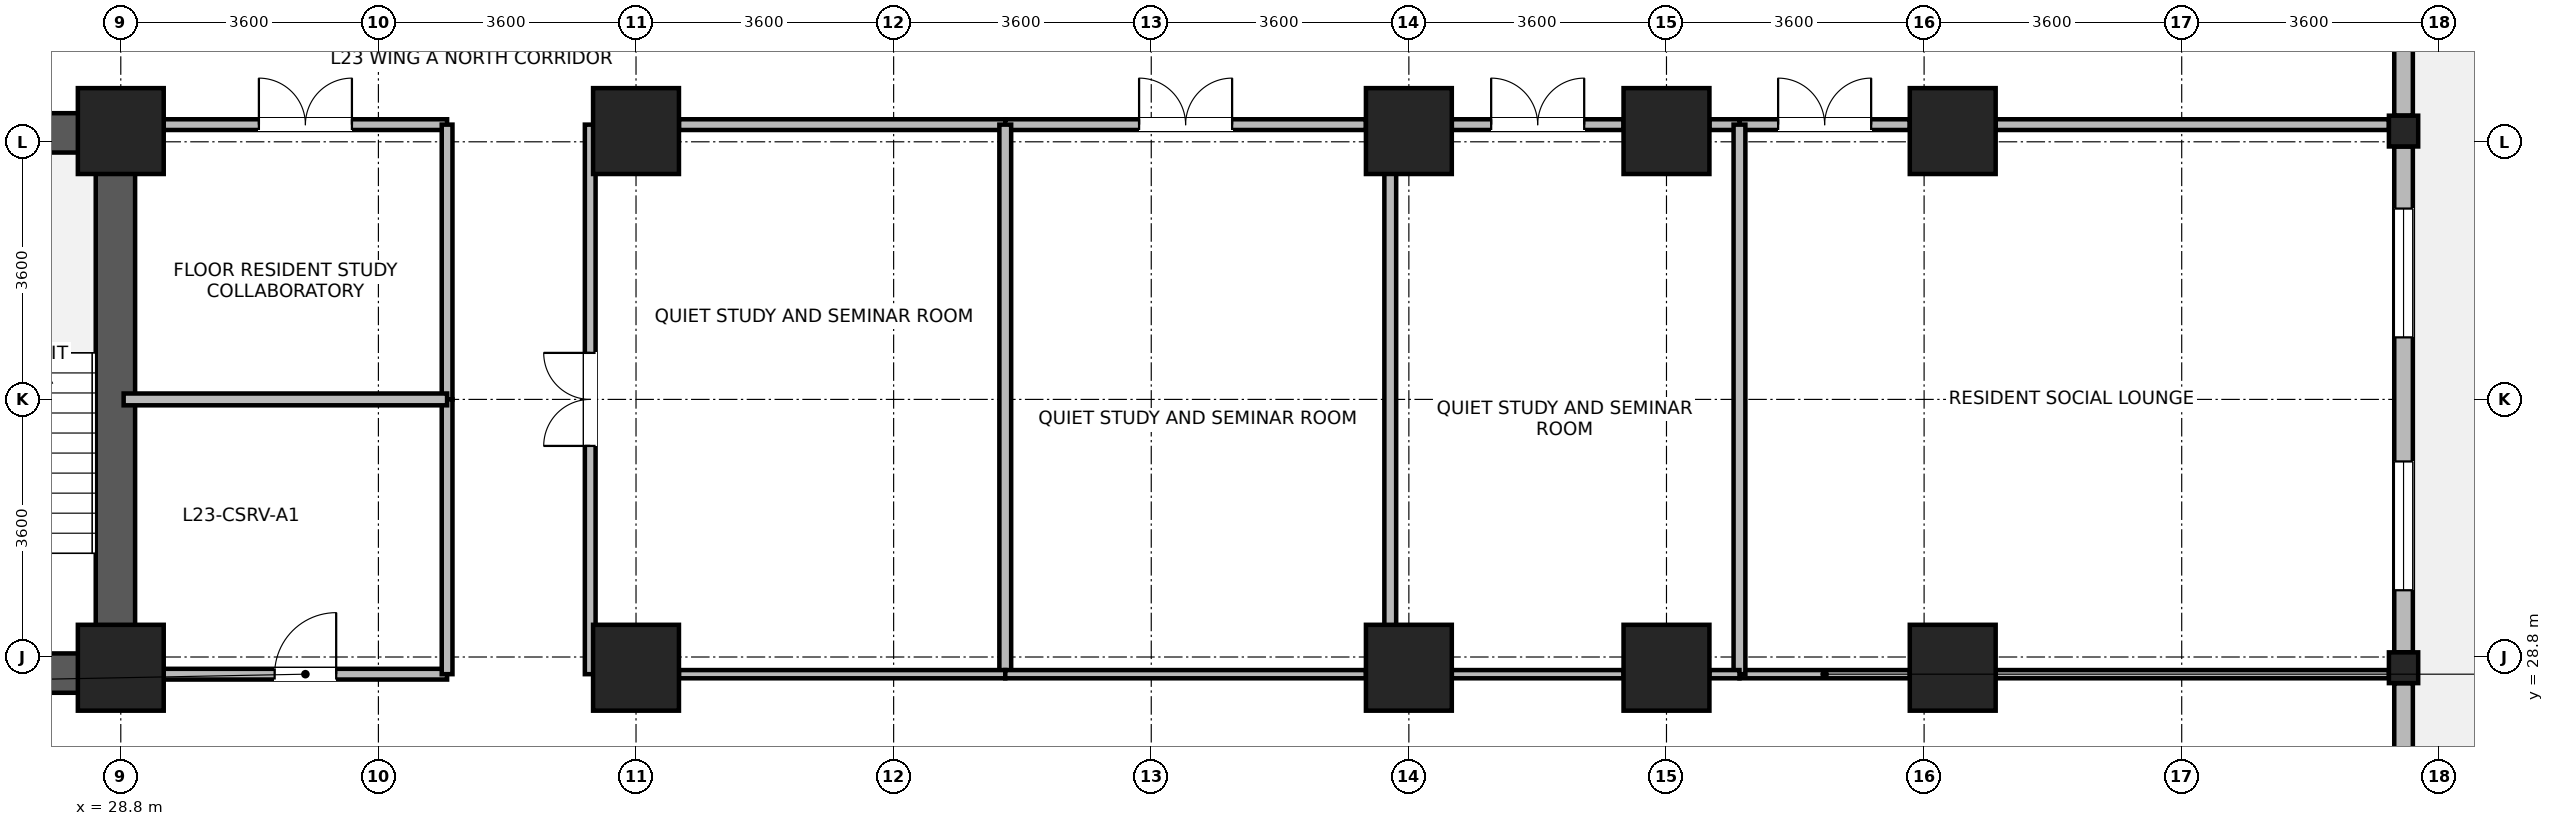
"""IFC4 building model, lengths in metres.
Left out: names, types, materials, properties, quantities, classifications, styles, units other than length and angle.
Written with IfcOpenShell. Run it as: python <this file> out.ifc"""

import sys

from ifc_helpers import new_model, si_unit, direction, frame, frame_2d, origin, origin_2d, place, context, subcontext, project, spatial, rectangle, i_section, extrude, source, transform, mapped, element, fill, save


model = new_model("IFC4")
c1 = context("Model", 3, precision=1e-05, world=origin(), true_north=direction((0.0, 1.0)))
c2 = subcontext(c1, "Body", "Model", "MODEL_VIEW")
j1 = project(units=[si_unit("LENGTHUNIT", "METRE"), si_unit("PLANEANGLEUNIT", "RADIAN")], contexts=[c1])
p1 = place(None, origin())
s1 = spatial("IfcSite", under=j1, at=p1, CompositionType="ELEMENT")
p2 = place(p1, origin())
s2 = spatial("IfcBuilding", under=s1, at=p2, CompositionType="ELEMENT")
p3 = place(p2, frame((0.0, 0.0, 93.4)))
s3 = spatial("IfcBuildingStorey", under=s2, at=p3, CompositionType="ELEMENT", Elevation=93.4)
p4 = place(p3, frame((28.725, 28.3, 0.0), z_axis=(0.0, 0.0, 1.0), x_axis=(0.0, 1.0, 0.0)))
e1 = element("IfcWall", 1, at=p4, inside=s3, PredefinedType="SHEAR", context=c2, shape_type="SweptSolid", body=[
    extrude(rectangle(XDim=8.1, YDim=0.55, at=frame_2d((4.05, 0.0))), origin(), (0.0, 0.0, 1.0), 3.45),
])
for number, where, z_axis, x_axis in (
    (2, (25.25, 28.575, 0.0), (0.0, 0.0, 1.0), (1.0, 0.0, 0.0)),
    (3, (25.25, 36.125, 0.0), (0.0, 0.0, 1.0), (1.0, 0.0, 0.0)),
):
    element("IfcWall", number, at=place(p3, frame(where, z_axis=z_axis, x_axis=x_axis)), inside=s3, PredefinedType="SHEAR", context=c2, shape_type="SweptSolid", body=[
        extrude(rectangle(XDim=3.2, YDim=0.55, at=frame_2d((1.6, 0.0))), origin(), (0.0, 0.0, 1.0), 3.45),
    ])
m1 = source(origin(), c2, "Body", "SweptSolid", [
    extrude(rectangle(XDim=1.2, YDim=1.2, at=origin_2d()), origin(), (0.0, 0.0, 1.0), 3.7),
])
for number, where, z_axis, x_axis in (
    (4, (28.8, 28.65, 0.0), (0.0, 0.0, 1.0), (1.0, 0.0, 0.0)),
    (5, (28.8, 36.15, 0.0), (0.0, 0.0, 1.0), (1.0, 0.0, 0.0)),
    (6, (36.0, 28.65, 0.0), (0.0, 0.0, 1.0), (1.0, 0.0, 0.0)),
    (7, (36.0, 36.15, 0.0), (0.0, 0.0, 1.0), (1.0, 0.0, 0.0)),
    (8, (46.8, 28.65, 0.0), (0.0, 0.0, 1.0), (1.0, 0.0, 0.0)),
    (9, (46.8, 36.15, 0.0), (0.0, 0.0, 1.0), (1.0, 0.0, 0.0)),
    (10, (50.4, 28.65, 0.0), (0.0, 0.0, 1.0), (1.0, 0.0, 0.0)),
    (11, (50.4, 36.15, 0.0), (0.0, 0.0, 1.0), (1.0, 0.0, 0.0)),
    (12, (54.4, 28.65, 0.0), (0.0, 0.0, 1.0), (1.0, 0.0, 0.0)),
    (13, (54.4, 36.15, 0.0), (0.0, 0.0, 1.0), (1.0, 0.0, 0.0)),
):
    element("IfcColumn", number, at=place(p3, frame(where, z_axis=z_axis, x_axis=x_axis)), inside=s3, PredefinedType="COLUMN", context=c2, shape_type="MappedRepresentation", body=[
        mapped(m1, transform((0.0, 0.0, 0.0), x_axis=(1.0, 0.0, 0.0), y_axis=(0.0, 1.0, 0.0), z_axis=(0.0, 0.0, 1.0), scale=1.0)),
    ])
m2 = source(origin(), c2, "Body", "SweptSolid", [
    extrude(i_section(OverallWidth=0.409, OverallDepth=0.43, WebThickness=0.024, FlangeThickness=0.033, FilletRadius=0.015, at=origin_2d()), origin(), (0.0, 0.0, 1.0), 3.7),
])
for number, where, z_axis, x_axis in (
    (14, (60.7, 28.65, 0.0), (0.0, 0.0, 1.0), (1.0, 0.0, 0.0)),
    (15, (60.7, 36.15, 0.0), (0.0, 0.0, 1.0), (1.0, 0.0, 0.0)),
):
    element("IfcColumn", number, at=place(p3, frame(where, z_axis=z_axis, x_axis=x_axis)), inside=s3, PredefinedType="COLUMN", context=c2, shape_type="MappedRepresentation", body=[
        mapped(m2, transform((0.0, 0.0, 0.0), x_axis=(1.0, 0.0, 0.0), y_axis=(0.0, 1.0, 0.0), z_axis=(0.0, 0.0, 1.0), scale=1.0)),
    ])
p5 = place(p3, frame((60.7, 28.434, 0.0), z_axis=(0.0, 0.0, 1.0), x_axis=(0.0, -1.0, 0.0)))
e16 = element("IfcWall", 16, at=p5, inside=s3, PredefinedType="STANDARD", context=c2, shape_type="SweptSolid", body=[
    extrude(rectangle(XDim=6.618, YDim=0.26, at=frame_2d((3.309, 0.0))), origin(), (0.0, 0.0, 1.0), 2.93),
])
p6 = place(p5, frame((4.063, 0.0, 0.85)))
e17 = element("IfcOpeningElement", 17, at=p6, cuts=e16, PredefinedType="OPENING", context=c2, shape_type="SweptSolid", body=[
    extrude(rectangle(XDim=1.8, YDim=1.85, at=frame_2d((0.9, 0.925))), frame((0.0, 0.14, 0.0), z_axis=(0.0, -1.0, 0.0), x_axis=(1.0, 0.0, 0.0)), (0.0, 0.0, 1.0), 0.28),
])
p7 = place(p5, frame((2.305, 0.0, 0.85)))
e18 = element("IfcOpeningElement", 18, at=p7, cuts=e16, PredefinedType="OPENING", context=c2, shape_type="SweptSolid", body=[
    extrude(rectangle(XDim=0.95, YDim=1.75, at=frame_2d((0.475, 0.875))), frame((0.0, 0.14, 0.0), z_axis=(0.0, -1.0, 0.0), x_axis=(1.0, 0.0, 0.0)), (0.0, 0.0, 1.0), 0.28),
])
p8 = place(p3, frame((60.7, 35.934, 0.0), z_axis=(0.0, 0.0, 1.0), x_axis=(0.0, -1.0, 0.0)))
e19 = element("IfcWall", 19, at=p8, inside=s3, PredefinedType="STANDARD", context=c2, shape_type="SweptSolid", body=[
    extrude(rectangle(XDim=7.068, YDim=0.26, at=frame_2d((3.534, 0.0))), origin(), (0.0, 0.0, 1.0), 2.93),
])
p9 = place(p8, frame((0.867, 0.0, 0.85)))
e20 = element("IfcOpeningElement", 20, at=p9, cuts=e19, PredefinedType="OPENING", context=c2, shape_type="SweptSolid", body=[
    extrude(rectangle(XDim=1.8, YDim=1.85, at=frame_2d((0.9, 0.925))), frame((0.0, 0.14, 0.0), z_axis=(0.0, -1.0, 0.0), x_axis=(1.0, 0.0, 0.0)), (0.0, 0.0, 1.0), 0.28),
])
p10 = place(p8, frame((4.401, 0.0, 0.85)))
e21 = element("IfcOpeningElement", 21, at=p10, cuts=e19, PredefinedType="OPENING", context=c2, shape_type="SweptSolid", body=[
    extrude(rectangle(XDim=1.8, YDim=1.85, at=frame_2d((0.9, 0.925))), frame((0.0, 0.14, 0.0), z_axis=(0.0, -1.0, 0.0), x_axis=(1.0, 0.0, 0.0)), (0.0, 0.0, 1.0), 0.28),
])
p11 = place(p3, frame((60.7, 43.33, 0.0), z_axis=(0.0, 0.0, 1.0), x_axis=(0.0, -1.0, 0.0)))
e22 = element("IfcWall", 22, at=p11, inside=s3, PredefinedType="STANDARD", context=c2, shape_type="SweptSolid", body=[
    extrude(rectangle(XDim=6.964, YDim=0.26, at=frame_2d((3.482, 0.0))), origin(), (0.0, 0.0, 1.0), 3.43),
])
p12 = place(p11, frame((0.841, 0.0, 0.85)))
e23 = element("IfcOpeningElement", 23, at=p12, cuts=e22, PredefinedType="OPENING", context=c2, shape_type="SweptSolid", body=[
    extrude(rectangle(XDim=1.8, YDim=1.85, at=frame_2d((0.9, 0.925))), frame((0.0, 0.14, 0.0), z_axis=(0.0, -1.0, 0.0), x_axis=(1.0, 0.0, 0.0)), (0.0, 0.0, 1.0), 0.28),
])
p13 = place(p11, frame((3.007, 0.0, 0.85)))
e24 = element("IfcOpeningElement", 24, at=p13, cuts=e22, PredefinedType="OPENING", context=c2, shape_type="SweptSolid", body=[
    extrude(rectangle(XDim=0.95, YDim=1.75, at=frame_2d((0.475, 0.875))), frame((0.0, 0.14, 0.0), z_axis=(0.0, -1.0, 0.0), x_axis=(1.0, 0.0, 0.0)), (0.0, 0.0, 1.0), 0.28),
])
p14 = place(p3, frame((51.42, 36.24, 0.0), z_axis=(0.0, 0.0, 1.0), x_axis=(1.0, 0.0, 0.0)))
e25 = element("IfcWall", 25, at=p14, inside=s3, PredefinedType="PARTITIONING", context=c2, shape_type="SweptSolid", body=[
    extrude(rectangle(XDim=2.38, YDim=0.15, at=frame_2d((1.19, 0.0))), origin(), (0.0, 0.0, 1.0), 2.78),
])
p15 = place(p14, frame((0.54, 0.0, 0.0)))
e26 = element("IfcOpeningElement", 26, at=p15, cuts=e25, PredefinedType="OPENING", context=c2, shape_type="SweptSolid", body=[
    extrude(rectangle(XDim=1.3, YDim=2.12, at=frame_2d((0.65, 1.06))), frame((0.0, 0.085, 0.0), z_axis=(0.0, -1.0, 0.0), x_axis=(1.0, 0.0, 0.0)), (0.0, 0.0, 1.0), 0.17),
])
p16 = place(p3, frame((55.0, 36.24, 0.0), z_axis=(0.0, 0.0, 1.0), x_axis=(1.0, 0.0, 0.0)))
e27 = element("IfcWall", 27, at=p16, inside=s3, PredefinedType="PARTITIONING", context=c2, shape_type="SweptSolid", body=[
    extrude(rectangle(XDim=5.496, YDim=0.15, at=frame_2d((2.748, 0.0))), origin(), (0.0, 0.0, 1.0), 2.78),
])
p17 = place(p3, frame((35.36, 28.56, 0.0), z_axis=(0.0, 0.0, 1.0), x_axis=(0.0, 1.0, 0.0)))
e28 = element("IfcWall", 28, at=p17, inside=s3, PredefinedType="PARTITIONING", context=c2, shape_type="SweptSolid", body=[
    extrude(rectangle(XDim=7.68, YDim=0.15, at=frame_2d((3.84, 0.0))), origin(), (0.0, 0.0, 1.0), 3.43),
])
p18 = place(p17, frame((3.19, 0.0, 0.0)))
e29 = element("IfcOpeningElement", 29, at=p18, cuts=e28, PredefinedType="OPENING", context=c2, shape_type="SweptSolid", body=[
    extrude(rectangle(XDim=1.3, YDim=2.12, at=frame_2d((0.65, 1.06))), frame((0.0, 0.085, 0.0), z_axis=(0.0, -1.0, 0.0), x_axis=(1.0, 0.0, 0.0)), (0.0, 0.0, 1.0), 0.17),
])
p19 = place(p3, frame((36.6, 36.24, 0.0), z_axis=(0.0, 0.0, 1.0), x_axis=(1.0, 0.0, 0.0)))
e30 = element("IfcWall", 30, at=p19, inside=s3, PredefinedType="PARTITIONING", context=c2, shape_type="SweptSolid", body=[
    extrude(rectangle(XDim=4.56, YDim=0.15, at=frame_2d((2.28, 0.0))), origin(), (0.0, 0.0, 1.0), 2.78),
])
p20 = place(p3, frame((41.16, 36.24, 0.0), z_axis=(0.0, 0.0, 1.0), x_axis=(1.0, 0.0, 0.0)))
e31 = element("IfcWall", 31, at=p20, inside=s3, PredefinedType="PARTITIONING", context=c2, shape_type="SweptSolid", body=[
    extrude(rectangle(XDim=5.04, YDim=0.15, at=frame_2d((2.52, 0.0))), origin(), (0.0, 0.0, 1.0), 2.78),
])
p21 = place(p20, frame((1.87, 0.0, 0.0)))
e32 = element("IfcOpeningElement", 32, at=p21, cuts=e31, PredefinedType="OPENING", context=c2, shape_type="SweptSolid", body=[
    extrude(rectangle(XDim=1.3, YDim=2.12, at=frame_2d((0.65, 1.06))), frame((0.0, 0.085, 0.0), z_axis=(0.0, -1.0, 0.0), x_axis=(1.0, 0.0, 0.0)), (0.0, 0.0, 1.0), 0.17),
])
p22 = place(p3, frame((47.4, 36.24, 0.0), z_axis=(0.0, 0.0, 1.0), x_axis=(1.0, 0.0, 0.0)))
e33 = element("IfcWall", 33, at=p22, inside=s3, PredefinedType="PARTITIONING", context=c2, shape_type="SweptSolid", body=[
    extrude(rectangle(XDim=2.4, YDim=0.15, at=frame_2d((1.2, 0.0))), origin(), (0.0, 0.0, 1.0), 2.78),
])
p23 = place(p22, frame((0.55, 0.0, 0.0)))
e34 = element("IfcOpeningElement", 34, at=p23, cuts=e33, PredefinedType="OPENING", context=c2, shape_type="SweptSolid", body=[
    extrude(rectangle(XDim=1.3, YDim=2.12, at=frame_2d((0.65, 1.06))), frame((0.0, 0.085, 0.0), z_axis=(0.0, -1.0, 0.0), x_axis=(1.0, 0.0, 0.0)), (0.0, 0.0, 1.0), 0.17),
])
p24 = place(p3, frame((51.0, 36.24, 0.0), z_axis=(0.0, 0.0, 1.0), x_axis=(1.0, 0.0, 0.0)))
e35 = element("IfcWall", 35, at=p24, inside=s3, PredefinedType="PARTITIONING", context=c2, shape_type="SweptSolid", body=[
    extrude(rectangle(XDim=0.42, YDim=0.15, at=frame_2d((0.21, 0.0))), origin(), (0.0, 0.0, 1.0), 2.78),
])
p25 = place(p3, frame((29.4, 28.56, 0.0), z_axis=(0.0, 0.0, 1.0), x_axis=(1.0, 0.0, 0.0)))
e36 = element("IfcWall", 36, at=p25, inside=s3, PredefinedType="PARTITIONING", context=c2, shape_type="SweptSolid", body=[
    extrude(rectangle(XDim=3.96, YDim=0.15, at=frame_2d((1.98, 0.0))), origin(), (0.0, 0.0, 1.0), 2.78),
])
p26 = place(p25, frame((1.55, 0.0, 0.0)))
e37 = element("IfcOpeningElement", 37, at=p26, cuts=e36, PredefinedType="OPENING", context=c2, shape_type="SweptSolid", body=[
    extrude(rectangle(XDim=0.86, YDim=2.02, at=frame_2d((0.43, 1.01))), frame((0.0, 0.085, 0.0), z_axis=(0.0, -1.0, 0.0), x_axis=(1.0, 0.0, 0.0)), (0.0, 0.0, 1.0), 0.17),
])
p27 = place(p3, frame((29.4, 36.24, 0.0), z_axis=(0.0, 0.0, 1.0), x_axis=(1.0, 0.0, 0.0)))
e38 = element("IfcWall", 38, at=p27, inside=s3, PredefinedType="PARTITIONING", context=c2, shape_type="SweptSolid", body=[
    extrude(rectangle(XDim=3.96, YDim=0.15, at=frame_2d((1.98, 0.0))), origin(), (0.0, 0.0, 1.0), 2.78),
])
p28 = place(p27, frame((1.33, 0.0, 0.0)))
e39 = element("IfcOpeningElement", 39, at=p28, cuts=e38, PredefinedType="OPENING", context=c2, shape_type="SweptSolid", body=[
    extrude(rectangle(XDim=1.3, YDim=2.12, at=frame_2d((0.65, 1.06))), frame((0.0, 0.085, 0.0), z_axis=(0.0, -1.0, 0.0), x_axis=(1.0, 0.0, 0.0)), (0.0, 0.0, 1.0), 0.17),
])
p29 = place(p3, frame((33.36, 32.4, 0.0), z_axis=(0.0, 0.0, 1.0), x_axis=(0.0, 1.0, 0.0)))
e40 = element("IfcWall", 40, at=p29, inside=s3, PredefinedType="PARTITIONING", context=c2, shape_type="SweptSolid", body=[
    extrude(rectangle(XDim=3.84, YDim=0.15, at=frame_2d((1.92, 0.0))), origin(), (0.0, 0.0, 1.0), 3.43),
])
p30 = place(p3, frame((33.36, 28.56, 0.0), z_axis=(0.0, 0.0, 1.0), x_axis=(0.0, 1.0, 0.0)))
e41 = element("IfcWall", 41, at=p30, inside=s3, PredefinedType="PARTITIONING", context=c2, shape_type="SweptSolid", body=[
    extrude(rectangle(XDim=3.84, YDim=0.15, at=frame_2d((1.92, 0.0))), origin(), (0.0, 0.0, 1.0), 3.43),
])
p31 = place(p3, frame((51.42, 28.56, 0.0), z_axis=(0.0, 0.0, 1.0), x_axis=(1.0, 0.0, 0.0)))
e42 = element("IfcWall", 42, at=p31, inside=s3, PredefinedType="PARTITIONING", context=c2, shape_type="SweptSolid", body=[
    extrude(rectangle(XDim=2.38, YDim=0.115, at=frame_2d((1.19, 0.0))), origin(), (0.0, 0.0, 1.0), 2.78),
])
p32 = place(p3, frame((55.0, 28.56, 0.0), z_axis=(0.0, 0.0, 1.0), x_axis=(1.0, 0.0, 0.0)))
e43 = element("IfcWall", 43, at=p32, inside=s3, PredefinedType="PARTITIONING", context=c2, shape_type="SweptSolid", body=[
    extrude(rectangle(XDim=5.496, YDim=0.115, at=frame_2d((2.748, 0.0))), origin(), (0.0, 0.0, 1.0), 2.78),
])
for number, where, z_axis, x_axis in (
    (44, (41.16, 28.56, 0.0), (0.0, 0.0, 1.0), (0.0, 1.0, 0.0)),
    (45, (46.54, 28.56, 0.0), (0.0, 0.0, 1.0), (0.0, 1.0, 0.0)),
    (46, (51.42, 28.56, 0.0), (0.0, 0.0, 1.0), (0.0, 1.0, 0.0)),
):
    element("IfcWall", number, at=place(p3, frame(where, z_axis=z_axis, x_axis=x_axis)), inside=s3, PredefinedType="PARTITIONING", context=c2, shape_type="SweptSolid", body=[
        extrude(rectangle(XDim=7.68, YDim=0.165, at=frame_2d((3.84, 0.0))), origin(), (0.0, 0.0, 1.0), 3.43),
    ])
p33 = place(p3, frame((36.6, 28.56, 0.0), z_axis=(0.0, 0.0, 1.0), x_axis=(1.0, 0.0, 0.0)))
e47 = element("IfcWall", 47, at=p33, inside=s3, PredefinedType="PARTITIONING", context=c2, shape_type="SweptSolid", body=[
    extrude(rectangle(XDim=4.56, YDim=0.115, at=frame_2d((2.28, 0.0))), origin(), (0.0, 0.0, 1.0), 2.78),
])
p34 = place(p3, frame((41.16, 28.56, 0.0), z_axis=(0.0, 0.0, 1.0), x_axis=(1.0, 0.0, 0.0)))
e48 = element("IfcWall", 48, at=p34, inside=s3, PredefinedType="PARTITIONING", context=c2, shape_type="SweptSolid", body=[
    extrude(rectangle(XDim=5.04, YDim=0.115, at=frame_2d((2.52, 0.0))), origin(), (0.0, 0.0, 1.0), 2.78),
])
p35 = place(p3, frame((47.4, 28.56, 0.0), z_axis=(0.0, 0.0, 1.0), x_axis=(1.0, 0.0, 0.0)))
e49 = element("IfcWall", 49, at=p35, inside=s3, PredefinedType="PARTITIONING", context=c2, shape_type="SweptSolid", body=[
    extrude(rectangle(XDim=2.4, YDim=0.115, at=frame_2d((1.2, 0.0))), origin(), (0.0, 0.0, 1.0), 2.78),
])
p36 = place(p3, frame((51.0, 28.56, 0.0), z_axis=(0.0, 0.0, 1.0), x_axis=(1.0, 0.0, 0.0)))
e50 = element("IfcWall", 50, at=p36, inside=s3, PredefinedType="PARTITIONING", context=c2, shape_type="SweptSolid", body=[
    extrude(rectangle(XDim=0.42, YDim=0.115, at=frame_2d((0.21, 0.0))), origin(), (0.0, 0.0, 1.0), 2.78),
])
p37 = place(p3, frame((28.84, 32.4, 0.0), z_axis=(0.0, 0.0, 1.0), x_axis=(1.0, 0.0, 0.0)))
e51 = element("IfcWall", 51, at=p37, inside=s3, PredefinedType="PARTITIONING", context=c2, shape_type="SweptSolid", body=[
    extrude(rectangle(XDim=4.52, YDim=0.165, at=frame_2d((2.26, 0.0))), origin(), (0.0, 0.0, 1.0), 3.43),
])
p38 = place(p9, origin())
e52 = element("IfcWindow", 52, at=p38, inside=s3, PartitioningType="SINGLE_PANEL", PredefinedType="WINDOW", context=c2, shape_type="SweptSolid", body=[
    extrude(rectangle(XDim=1.8, YDim=1.85, at=frame_2d((0.9, 0.925))), frame((0.0, 0.03, 0.0), z_axis=(0.0, -1.0, 0.0), x_axis=(1.0, 0.0, 0.0)), (0.0, 0.0, 1.0), 0.06),
])
fill(e20, e52)
p39 = place(p10, origin())
e53 = element("IfcWindow", 53, at=p39, inside=s3, PartitioningType="SINGLE_PANEL", PredefinedType="WINDOW", context=c2, shape_type="SweptSolid", body=[
    extrude(rectangle(XDim=1.8, YDim=1.85, at=frame_2d((0.9, 0.925))), frame((0.0, 0.03, 0.0), z_axis=(0.0, -1.0, 0.0), x_axis=(1.0, 0.0, 0.0)), (0.0, 0.0, 1.0), 0.06),
])
fill(e21, e53)
p40 = place(p15, origin())
e54 = element("IfcDoor", 54, at=p40, inside=s3, OperationType="DOUBLE_DOOR_SINGLE_SWING", PredefinedType="DOOR", context=c2, shape_type="SweptSolid", body=[
    extrude(rectangle(XDim=1.3, YDim=2.12, at=frame_2d((0.65, 1.06))), frame((0.0, 0.025, 0.0), z_axis=(0.0, -1.0, 0.0), x_axis=(1.0, 0.0, 0.0)), (0.0, 0.0, 1.0), 0.05),
])
fill(e26, e54)
p41 = place(p18, origin())
e55 = element("IfcDoor", 55, at=p41, inside=s3, OperationType="DOUBLE_DOOR_SINGLE_SWING", PredefinedType="DOOR", context=c2, shape_type="SweptSolid", body=[
    extrude(rectangle(XDim=1.3, YDim=2.12, at=frame_2d((0.65, 1.06))), frame((0.0, 0.025, 0.0), z_axis=(0.0, -1.0, 0.0), x_axis=(1.0, 0.0, 0.0)), (0.0, 0.0, 1.0), 0.05),
])
fill(e29, e55)
p42 = place(p21, origin())
e56 = element("IfcDoor", 56, at=p42, inside=s3, OperationType="DOUBLE_DOOR_SINGLE_SWING", PredefinedType="DOOR", context=c2, shape_type="SweptSolid", body=[
    extrude(rectangle(XDim=1.3, YDim=2.12, at=frame_2d((0.65, 1.06))), frame((0.0, 0.025, 0.0), z_axis=(0.0, -1.0, 0.0), x_axis=(1.0, 0.0, 0.0)), (0.0, 0.0, 1.0), 0.05),
])
fill(e32, e56)
p43 = place(p23, origin())
e57 = element("IfcDoor", 57, at=p43, inside=s3, OperationType="DOUBLE_DOOR_SINGLE_SWING", PredefinedType="DOOR", context=c2, shape_type="SweptSolid", body=[
    extrude(rectangle(XDim=1.3, YDim=2.12, at=frame_2d((0.65, 1.06))), frame((0.0, 0.025, 0.0), z_axis=(0.0, -1.0, 0.0), x_axis=(1.0, 0.0, 0.0)), (0.0, 0.0, 1.0), 0.05),
])
fill(e34, e57)
p44 = place(p26, origin())
e58 = element("IfcDoor", 58, at=p44, inside=s3, OperationType="SINGLE_SWING_RIGHT", PredefinedType="DOOR", context=c2, shape_type="SweptSolid", body=[
    extrude(rectangle(XDim=0.86, YDim=2.02, at=frame_2d((0.43, 1.01))), frame((0.0, 0.025, 0.0), z_axis=(0.0, -1.0, 0.0), x_axis=(1.0, 0.0, 0.0)), (0.0, 0.0, 1.0), 0.05),
])
fill(e37, e58)
p45 = place(p28, origin())
e59 = element("IfcDoor", 59, at=p45, inside=s3, OperationType="DOUBLE_DOOR_SINGLE_SWING", PredefinedType="DOOR", context=c2, shape_type="SweptSolid", body=[
    extrude(rectangle(XDim=1.3, YDim=2.12, at=frame_2d((0.65, 1.06))), frame((0.0, 0.025, 0.0), z_axis=(0.0, -1.0, 0.0), x_axis=(1.0, 0.0, 0.0)), (0.0, 0.0, 1.0), 0.05),
])
fill(e39, e59)
save(model, sys.argv[1])
